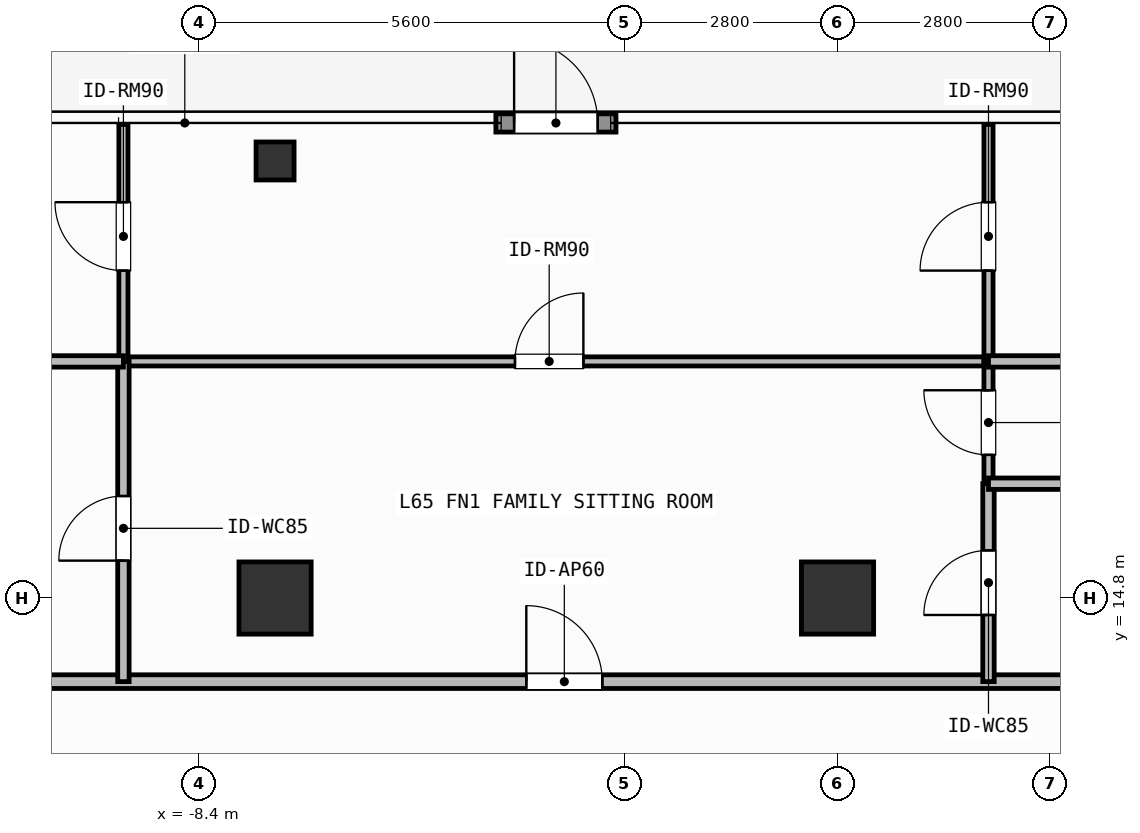
"""IFC4 building model, lengths in metres.
Left out: names, types, materials, properties, quantities, classifications, styles, units other than length and angle.
Written with IfcOpenShell. Run it as: python <this file> out.ifc"""

import sys

from ifc_helpers import new_model, si_unit, direction, frame, frame_2d, origin, origin_2d, place, context, subcontext, project, spatial, rectangle, hollow_rectangle, extrude, element, fill, save


model = new_model("IFC4")
c1 = context("Model", 3, precision=1e-05, world=origin(), true_north=direction((0.0, 1.0)))
c2 = subcontext(c1, "Body", "Model", "MODEL_VIEW")
j1 = project(units=[si_unit("LENGTHUNIT", "METRE"), si_unit("PLANEANGLEUNIT", "RADIAN")], contexts=[c1])
p1 = place(None, origin())
s1 = spatial("IfcSite", under=j1, at=p1, CompositionType="ELEMENT")
p2 = place(p1, origin())
s2 = spatial("IfcBuilding", under=s1, at=p2, CompositionType="ELEMENT")
p3 = place(p2, frame((0.0, 0.0, 266.4)))
s3 = spatial("IfcBuildingStorey", under=s2, at=p3, CompositionType="ELEMENT", Elevation=266.4)
for number, where, z_axis, x_axis in (
    (1, (-7.4, 14.8, 0.0), (0.0, 0.0, 1.0), (1.0, 0.0, 0.0)),
    (2, (0.0, 14.8, 0.0), (0.0, 0.0, 1.0), (1.0, 0.0, 0.0)),
):
    element("IfcColumn", number, at=place(p3, frame(where, z_axis=z_axis, x_axis=x_axis)), inside=s3, PredefinedType="COLUMN", context=c2, shape_type="SweptSolid", body=[
        extrude(rectangle(XDim=0.95, YDim=0.95, at=origin_2d()), origin(), (0.0, 0.0, 1.0), 3.9),
    ])
p4 = place(p3, frame((-7.4, 20.55, 0.0), z_axis=(0.0, 0.0, 1.0), x_axis=(1.0, 0.0, 0.0)))
e3 = element("IfcColumn", 3, at=p4, inside=s3, PredefinedType="COLUMN", context=c2, shape_type="SweptSolid", body=[
    extrude(hollow_rectangle(XDim=0.5, YDim=0.5, WallThickness=0.025, at=origin_2d()), origin(), (0.0, 0.0, 1.0), 3.9),
])
p5 = place(p3, frame((-4.495, 21.05, 0.0), z_axis=(0.0, 0.0, 1.0), x_axis=(1.0, 0.0, 0.0)))
e4 = element("IfcWall", 4, at=p5, inside=s3, PredefinedType="SOLIDWALL", context=c2, shape_type="SweptSolid", body=[
    extrude(rectangle(XDim=1.58, YDim=0.24, at=frame_2d((0.79, 0.0))), origin(), (0.0, 0.0, 1.0), 3.68),
])
p6 = place(p5, frame((0.24, 0.0, 0.0)))
e5 = element("IfcOpeningElement", 5, at=p6, cuts=e4, PredefinedType="OPENING", context=c2, shape_type="SweptSolid", body=[
    extrude(rectangle(XDim=1.1, YDim=2.2, at=frame_2d((0.55, 1.1))), frame((0.0, 0.13, 0.0), z_axis=(0.0, -1.0, 0.0), x_axis=(1.0, 0.0, 0.0)), (0.0, 0.0, 1.0), 0.26),
])
p7 = place(p3, frame((-13.72, 13.7, 0.0), z_axis=(0.0, 0.0, 1.0), x_axis=(1.0, 0.0, 0.0)))
e6 = element("IfcWall", 6, at=p7, inside=s3, PredefinedType="PARTITIONING", context=c2, shape_type="SweptSolid", body=[
    extrude(rectangle(XDim=21.144, YDim=0.18, at=frame_2d((10.572, 0.0))), origin(), (0.0, 0.0, 1.0), 3.68),
])
p8 = place(p7, frame((9.625, 0.0, 0.0)))
e7 = element("IfcOpeningElement", 7, at=p8, cuts=e6, PredefinedType="OPENING", context=c2, shape_type="SweptSolid", body=[
    extrude(rectangle(XDim=1.0, YDim=2.2, at=frame_2d((0.5, 1.1))), frame((0.0, 0.1, 0.0), z_axis=(0.0, -1.0, 0.0), x_axis=(1.0, 0.0, 0.0)), (0.0, 0.0, 1.0), 0.2),
])
p9 = place(p3, frame((-9.395, 17.913, 0.0), z_axis=(0.0, 0.0, 1.0), x_axis=(1.0, 0.0, 0.0)))
e8 = element("IfcWall", 8, at=p9, inside=s3, PredefinedType="PARTITIONING", context=c2, shape_type="SweptSolid", body=[
    extrude(rectangle(XDim=11.381, YDim=0.12, at=frame_2d((5.69, 0.0))), origin(), (0.0, 0.0, 1.0), 3.68),
])
p10 = place(p9, frame((5.151, 0.0, 0.0)))
e9 = element("IfcOpeningElement", 9, at=p10, cuts=e8, PredefinedType="OPENING", context=c2, shape_type="SweptSolid", body=[
    extrude(rectangle(XDim=0.9, YDim=2.1, at=frame_2d((0.45, 1.05))), frame((0.0, 0.07, 0.0), z_axis=(0.0, -1.0, 0.0), x_axis=(1.0, 0.0, 0.0)), (0.0, 0.0, 1.0), 0.14),
])
p11 = place(p3, frame((-9.395, 13.7, 0.0), z_axis=(0.0, 0.0, 1.0), x_axis=(0.0, 1.0, 0.0)))
e10 = element("IfcWall", 10, at=p11, inside=s3, PredefinedType="PARTITIONING", context=c2, shape_type="SweptSolid", body=[
    extrude(rectangle(XDim=4.213, YDim=0.15, at=frame_2d((2.106, 0.0))), origin(), (0.0, 0.0, 1.0), 3.68),
])
p12 = place(p11, frame((1.592, 0.0, 0.0)))
e11 = element("IfcOpeningElement", 11, at=p12, cuts=e10, PredefinedType="OPENING", context=c2, shape_type="SweptSolid", body=[
    extrude(rectangle(XDim=0.85, YDim=2.1, at=frame_2d((0.425, 1.05))), frame((0.0, 0.085, 0.0), z_axis=(0.0, -1.0, 0.0), x_axis=(1.0, 0.0, 0.0)), (0.0, 0.0, 1.0), 0.17),
])
p13 = place(p3, frame((-9.395, 17.913, 0.0), z_axis=(0.0, 0.0, 1.0), x_axis=(0.0, 1.0, 0.0)))
e12 = element("IfcWall", 12, at=p13, inside=s3, PredefinedType="PARTITIONING", context=c2, shape_type="SweptSolid", body=[
    extrude(rectangle(XDim=3.117, YDim=0.12, at=frame_2d((1.559, 0.0))), origin(), (0.0, 0.0, 1.0), 3.68),
])
p14 = place(p13, frame((1.195, 0.0, 0.0)))
e13 = element("IfcOpeningElement", 13, at=p14, cuts=e12, PredefinedType="OPENING", context=c2, shape_type="SweptSolid", body=[
    extrude(rectangle(XDim=0.9, YDim=2.1, at=frame_2d((0.45, 1.05))), frame((0.0, 0.07, 0.0), z_axis=(0.0, -1.0, 0.0), x_axis=(1.0, 0.0, 0.0)), (0.0, 0.0, 1.0), 0.14),
])
p15 = place(p3, frame((1.986, 13.7, 0.0), z_axis=(0.0, 0.0, 1.0), x_axis=(0.0, 1.0, 0.0)))
e14 = element("IfcWall", 14, at=p15, inside=s3, PredefinedType="PARTITIONING", context=c2, shape_type="SweptSolid", body=[
    extrude(rectangle(XDim=2.604, YDim=0.15, at=frame_2d((1.302, 0.0))), origin(), (0.0, 0.0, 1.0), 3.68),
])
p16 = place(p15, frame((0.877, 0.0, 0.0)))
e15 = element("IfcOpeningElement", 15, at=p16, cuts=e14, PredefinedType="OPENING", context=c2, shape_type="SweptSolid", body=[
    extrude(rectangle(XDim=0.85, YDim=2.1, at=frame_2d((0.425, 1.05))), frame((0.0, 0.085, 0.0), z_axis=(0.0, -1.0, 0.0), x_axis=(1.0, 0.0, 0.0)), (0.0, 0.0, 1.0), 0.17),
])
p17 = place(p3, frame((1.986, 16.304, 0.0), z_axis=(0.0, 0.0, 1.0), x_axis=(0.0, 1.0, 0.0)))
e16 = element("IfcWall", 16, at=p17, inside=s3, PredefinedType="PARTITIONING", context=c2, shape_type="SweptSolid", body=[
    extrude(rectangle(XDim=1.609, YDim=0.12, at=frame_2d((0.805, 0.0))), origin(), (0.0, 0.0, 1.0), 3.68),
])
p18 = place(p17, frame((0.379, 0.0, 0.0)))
e17 = element("IfcOpeningElement", 17, at=p18, cuts=e16, PredefinedType="OPENING", context=c2, shape_type="SweptSolid", body=[
    extrude(rectangle(XDim=0.85, YDim=2.1, at=frame_2d((0.425, 1.05))), frame((0.0, 0.07, 0.0), z_axis=(0.0, -1.0, 0.0), x_axis=(1.0, 0.0, 0.0)), (0.0, 0.0, 1.0), 0.14),
])
p19 = place(p3, frame((1.986, 17.913, 0.0), z_axis=(0.0, 0.0, 1.0), x_axis=(0.0, 1.0, 0.0)))
e18 = element("IfcWall", 18, at=p19, inside=s3, PredefinedType="PARTITIONING", context=c2, shape_type="SweptSolid", body=[
    extrude(rectangle(XDim=3.117, YDim=0.12, at=frame_2d((1.559, 0.0))), origin(), (0.0, 0.0, 1.0), 3.68),
])
p20 = place(p19, frame((1.195, 0.0, 0.0)))
e19 = element("IfcOpeningElement", 19, at=p20, cuts=e18, PredefinedType="OPENING", context=c2, shape_type="SweptSolid", body=[
    extrude(rectangle(XDim=0.9, YDim=2.1, at=frame_2d((0.45, 1.05))), frame((0.0, 0.07, 0.0), z_axis=(0.0, -1.0, 0.0), x_axis=(1.0, 0.0, 0.0)), (0.0, 0.0, 1.0), 0.14),
])
p21 = place(p3, frame((-13.72, 17.913, 0.0), z_axis=(0.0, 0.0, 1.0), x_axis=(1.0, 0.0, 0.0)))
e20 = element("IfcWall", 20, at=p21, inside=s3, PredefinedType="PARTITIONING", context=c2, shape_type="SweptSolid", body=[
    extrude(rectangle(XDim=4.325, YDim=0.15, at=frame_2d((2.163, 0.0))), origin(), (0.0, 0.0, 1.0), 3.68),
])
for number, where, z_axis, x_axis in (
    (21, (1.986, 16.304, 0.0), (0.0, 0.0, 1.0), (1.0, 0.0, 0.0)),
    (22, (1.986, 17.913, 0.0), (0.0, 0.0, 1.0), (1.0, 0.0, 0.0)),
):
    element("IfcWall", number, at=place(p3, frame(where, z_axis=z_axis, x_axis=x_axis)), inside=s3, PredefinedType="PARTITIONING", context=c2, shape_type="SweptSolid", body=[
        extrude(rectangle(XDim=5.438, YDim=0.15, at=frame_2d((2.719, 0.0))), origin(), (0.0, 0.0, 1.0), 3.68),
    ])
p22 = place(p6, origin())
e23 = element("IfcDoor", 23, at=p22, inside=s3, OperationType="SINGLE_SWING_LEFT", PredefinedType="DOOR", context=c2, shape_type="SweptSolid", body=[
    extrude(rectangle(XDim=1.1, YDim=2.2, at=frame_2d((0.55, 1.1))), frame((0.0, 0.025, 0.0), z_axis=(0.0, -1.0, 0.0), x_axis=(1.0, 0.0, 0.0)), (0.0, 0.0, 1.0), 0.05),
])
fill(e5, e23)
p23 = place(p8, origin())
e24 = element("IfcDoor", 24, at=p23, inside=s3, OperationType="SINGLE_SWING_LEFT", PredefinedType="DOOR", context=c2, shape_type="SweptSolid", body=[
    extrude(rectangle(XDim=1.0, YDim=2.2, at=frame_2d((0.5, 1.1))), frame((0.0, 0.025, 0.0), z_axis=(0.0, -1.0, 0.0), x_axis=(1.0, 0.0, 0.0)), (0.0, 0.0, 1.0), 0.05),
])
fill(e7, e24)
p24 = place(p10, origin())
e25 = element("IfcDoor", 25, at=p24, inside=s3, OperationType="SINGLE_SWING_RIGHT", PredefinedType="DOOR", context=c2, shape_type="SweptSolid", body=[
    extrude(rectangle(XDim=0.9, YDim=2.1, at=frame_2d((0.45, 1.05))), frame((0.0, 0.025, 0.0), z_axis=(0.0, -1.0, 0.0), x_axis=(1.0, 0.0, 0.0)), (0.0, 0.0, 1.0), 0.05),
])
fill(e9, e25)
p25 = place(p12, origin())
e26 = element("IfcDoor", 26, at=p25, inside=s3, OperationType="SINGLE_SWING_LEFT", PredefinedType="DOOR", context=c2, shape_type="SweptSolid", body=[
    extrude(rectangle(XDim=0.85, YDim=2.1, at=frame_2d((0.425, 1.05))), frame((0.0, 0.025, 0.0), z_axis=(0.0, -1.0, 0.0), x_axis=(1.0, 0.0, 0.0)), (0.0, 0.0, 1.0), 0.05),
])
fill(e11, e26)
p26 = place(p14, origin())
e27 = element("IfcDoor", 27, at=p26, inside=s3, OperationType="SINGLE_SWING_RIGHT", PredefinedType="DOOR", context=c2, shape_type="SweptSolid", body=[
    extrude(rectangle(XDim=0.9, YDim=2.1, at=frame_2d((0.45, 1.05))), frame((0.0, 0.025, 0.0), z_axis=(0.0, -1.0, 0.0), x_axis=(1.0, 0.0, 0.0)), (0.0, 0.0, 1.0), 0.05),
])
fill(e13, e27)
p27 = place(p16, origin())
e28 = element("IfcDoor", 28, at=p27, inside=s3, OperationType="SINGLE_SWING_LEFT", PredefinedType="DOOR", context=c2, shape_type="SweptSolid", body=[
    extrude(rectangle(XDim=0.85, YDim=2.1, at=frame_2d((0.425, 1.05))), frame((0.0, 0.025, 0.0), z_axis=(0.0, -1.0, 0.0), x_axis=(1.0, 0.0, 0.0)), (0.0, 0.0, 1.0), 0.05),
])
fill(e15, e28)
p28 = place(p18, origin())
e29 = element("IfcDoor", 29, at=p28, inside=s3, OperationType="SINGLE_SWING_RIGHT", PredefinedType="DOOR", context=c2, shape_type="SweptSolid", body=[
    extrude(rectangle(XDim=0.85, YDim=2.1, at=frame_2d((0.425, 1.05))), frame((0.0, 0.025, 0.0), z_axis=(0.0, -1.0, 0.0), x_axis=(1.0, 0.0, 0.0)), (0.0, 0.0, 1.0), 0.05),
])
fill(e17, e29)
p29 = place(p20, origin())
e30 = element("IfcDoor", 30, at=p29, inside=s3, OperationType="SINGLE_SWING_LEFT", PredefinedType="DOOR", context=c2, shape_type="SweptSolid", body=[
    extrude(rectangle(XDim=0.9, YDim=2.1, at=frame_2d((0.45, 1.05))), frame((0.0, 0.025, 0.0), z_axis=(0.0, -1.0, 0.0), x_axis=(1.0, 0.0, 0.0)), (0.0, 0.0, 1.0), 0.05),
])
fill(e19, e30)
save(model, sys.argv[1])
